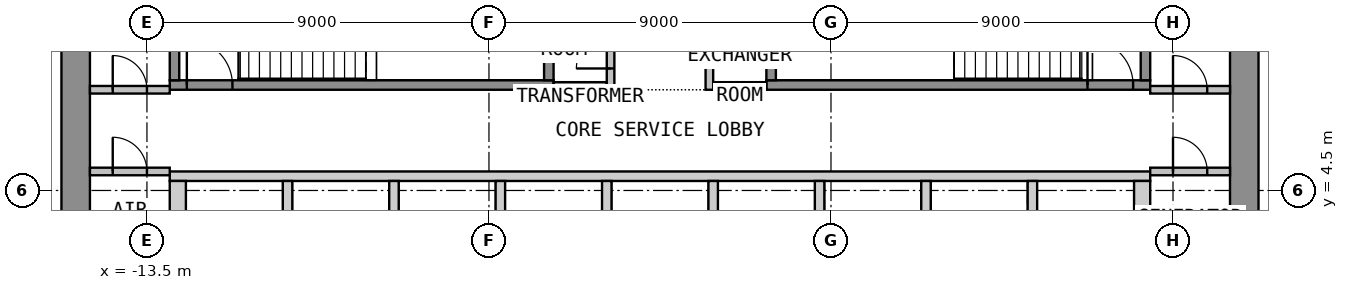
"""IFC4 building model, lengths in metres.
Left out: names, types, materials, properties, quantities, classifications, styles, units other than length and angle.
Written with IfcOpenShell. Run it as: python <this file> out.ifc"""

import sys

from ifc_helpers import new_model, si_unit, direction, frame, frame_2d, origin, place, context, subcontext, project, spatial, polyline, rectangle, outline, extrude, element, fill, save


model = new_model("IFC4")
c1 = context("Model", 3, precision=1e-05, world=origin(), true_north=direction((0.0, 1.0)))
c2 = subcontext(c1, "Body", "Model", "MODEL_VIEW")
j1 = project(units=[si_unit("LENGTHUNIT", "METRE"), si_unit("PLANEANGLEUNIT", "RADIAN")], contexts=[c1])
p1 = place(None, origin())
s1 = spatial("IfcSite", under=j1, at=p1, CompositionType="ELEMENT")
p2 = place(p1, origin())
s2 = spatial("IfcBuilding", under=s1, at=p2, CompositionType="ELEMENT")
p3 = place(p2, frame((0.0, 0.0, 128.1)))
s3 = spatial("IfcBuildingStorey", under=s2, at=p3, CompositionType="ELEMENT", Elevation=128.1)
p4 = place(p3, frame((-15.375, -12.75, 0.0), z_axis=(0.0, 0.0, 1.0), x_axis=(0.0, 1.0, 0.0)))
e1 = element("IfcWall", 1, at=p4, inside=s3, PredefinedType="SHEAR", context=c2, shape_type="SweptSolid", body=[
    extrude(rectangle(XDim=25.5, YDim=0.75, at=frame_2d((12.75, 0.0))), origin(), (0.0, 0.0, 1.0), 4.175),
])
p5 = place(p4, frame((11.55, 0.0, 0.0)))
e2 = element("IfcOpeningElement", 2, at=p5, cuts=e1, PredefinedType="OPENING", context=c2, shape_type="SweptSolid", body=[
    extrude(rectangle(XDim=2.4, YDim=2.1, at=frame_2d((1.2, 1.05))), frame((0.0, 0.385, 0.0), z_axis=(0.0, -1.0, 0.0), x_axis=(1.0, 0.0, 0.0)), (0.0, 0.0, 1.0), 0.77),
])
p6 = place(p3, frame((15.375, -12.75, 0.0), z_axis=(0.0, 0.0, 1.0), x_axis=(0.0, 1.0, 0.0)))
e3 = element("IfcWall", 3, at=p6, inside=s3, PredefinedType="SHEAR", context=c2, shape_type="SweptSolid", body=[
    extrude(rectangle(XDim=25.5, YDim=0.75, at=frame_2d((12.75, 0.0))), origin(), (0.0, 0.0, 1.0), 4.175),
])
p7 = place(p6, frame((11.55, 0.0, 0.0)))
e4 = element("IfcOpeningElement", 4, at=p7, cuts=e3, PredefinedType="OPENING", context=c2, shape_type="SweptSolid", body=[
    extrude(rectangle(XDim=2.4, YDim=2.1, at=frame_2d((1.2, 1.05))), frame((0.0, 0.385, 0.0), z_axis=(0.0, -1.0, 0.0), x_axis=(1.0, 0.0, 0.0)), (0.0, 0.0, 1.0), 0.77),
])
p8 = place(p3, origin())
e5 = element("IfcWall", 5, at=p8, inside=s3, PredefinedType="SHEAR", context=c2, shape_type="SweptSolid", body=[
    extrude(outline(polyline([(-12.9, 4.75), (12.9, 4.75), (12.9, 5.0), (-12.9, 5.0), (-12.9, 4.75)])), origin(), (0.0, 0.0, 1.0), 4.175),
])
p9 = place(p3, origin())
e6 = element("IfcWall", 6, at=p9, inside=s3, PredefinedType="SHEAR", context=c2, shape_type="SweptSolid", body=[
    extrude(outline(polyline([(-12.9, 2.05), (-12.475, 2.05), (-12.475, 4.75), (-12.9, 4.75), (-12.9, 2.05)])), origin(), (0.0, 0.0, 1.0), 4.175),
])
p10 = place(p3, origin())
e7 = element("IfcWall", 7, at=p10, inside=s3, PredefinedType="SHEAR", context=c2, shape_type="SweptSolid", body=[
    extrude(outline(polyline([(-9.925, 2.05), (-9.675, 2.05), (-9.675, 4.75), (-9.925, 4.75), (-9.925, 2.05)])), origin(), (0.0, 0.0, 1.0), 4.175),
])
p11 = place(p3, origin())
e8 = element("IfcWall", 8, at=p11, inside=s3, PredefinedType="SHEAR", context=c2, shape_type="SweptSolid", body=[
    extrude(outline(polyline([(-7.125, 2.05), (-6.875, 2.05), (-6.875, 4.75), (-7.125, 4.75), (-7.125, 2.05)])), origin(), (0.0, 0.0, 1.0), 4.175),
])
p12 = place(p3, origin())
e9 = element("IfcWall", 9, at=p12, inside=s3, PredefinedType="SHEAR", context=c2, shape_type="SweptSolid", body=[
    extrude(outline(polyline([(-4.325, 2.05), (-4.075, 2.05), (-4.075, 4.75), (-4.325, 4.75), (-4.325, 2.05)])), origin(), (0.0, 0.0, 1.0), 4.175),
])
p13 = place(p3, origin())
e10 = element("IfcWall", 10, at=p13, inside=s3, PredefinedType="SHEAR", context=c2, shape_type="SweptSolid", body=[
    extrude(outline(polyline([(-1.525, 2.05), (-1.275, 2.05), (-1.275, 4.75), (-1.525, 4.75), (-1.525, 2.05)])), origin(), (0.0, 0.0, 1.0), 4.175),
])
p14 = place(p3, origin())
e11 = element("IfcWall", 11, at=p14, inside=s3, PredefinedType="SHEAR", context=c2, shape_type="SweptSolid", body=[
    extrude(outline(polyline([(1.275, 2.05), (1.525, 2.05), (1.525, 4.75), (1.275, 4.75), (1.275, 2.05)])), origin(), (0.0, 0.0, 1.0), 4.175),
])
p15 = place(p3, origin())
e12 = element("IfcWall", 12, at=p15, inside=s3, PredefinedType="SHEAR", context=c2, shape_type="SweptSolid", body=[
    extrude(outline(polyline([(4.075, 2.05), (4.325, 2.05), (4.325, 4.75), (4.075, 4.75), (4.075, 2.05)])), origin(), (0.0, 0.0, 1.0), 4.175),
])
p16 = place(p3, origin())
e13 = element("IfcWall", 13, at=p16, inside=s3, PredefinedType="SHEAR", context=c2, shape_type="SweptSolid", body=[
    extrude(outline(polyline([(6.875, 2.05), (7.125, 2.05), (7.125, 4.75), (6.875, 4.75), (6.875, 2.05)])), origin(), (0.0, 0.0, 1.0), 4.175),
])
p17 = place(p3, origin())
e14 = element("IfcWall", 14, at=p17, inside=s3, PredefinedType="SHEAR", context=c2, shape_type="SweptSolid", body=[
    extrude(outline(polyline([(9.675, 2.05), (9.925, 2.05), (9.925, 4.75), (9.675, 4.75), (9.675, 2.05)])), origin(), (0.0, 0.0, 1.0), 4.175),
])
p18 = place(p3, origin())
e15 = element("IfcWall", 15, at=p18, inside=s3, PredefinedType="SHEAR", context=c2, shape_type="SweptSolid", body=[
    extrude(outline(polyline([(12.475, 2.05), (12.9, 2.05), (12.9, 4.75), (12.475, 4.75), (12.475, 2.05)])), origin(), (0.0, 0.0, 1.0), 4.175),
])
p19 = place(p3, frame((-12.9, 7.275, 0.0), z_axis=(0.0, 0.0, 1.0), x_axis=(1.0, 0.0, 0.0)))
e16 = element("IfcWall", 16, at=p19, inside=s3, PredefinedType="SHEAR", context=c2, shape_type="SweptSolid", body=[
    extrude(rectangle(XDim=10.1, YDim=0.25, at=frame_2d((5.05, 0.0))), origin(), (0.0, 0.0, 1.0), 4.175),
])
p20 = place(p19, frame((0.45, 0.0, 0.0)))
e17 = element("IfcOpeningElement", 17, at=p20, cuts=e16, PredefinedType="OPENING", context=c2, shape_type="SweptSolid", body=[
    extrude(rectangle(XDim=1.2, YDim=2.1, at=frame_2d((0.6, 1.05))), frame((0.0, 0.135, 0.0), z_axis=(0.0, -1.0, 0.0), x_axis=(1.0, 0.0, 0.0)), (0.0, 0.0, 1.0), 0.27),
])
for number, where, z_axis, x_axis in (
    (18, (-12.775, 7.4, 0.0), (0.0, 0.0, 1.0), (0.0, 1.0, 0.0)),
    (19, (-2.925, 7.4, 0.0), (0.0, 0.0, 1.0), (0.0, 1.0, 0.0)),
):
    element("IfcWall", number, at=place(p3, frame(where, z_axis=z_axis, x_axis=x_axis)), inside=s3, PredefinedType="SHEAR", context=c2, shape_type="SweptSolid", body=[
        extrude(rectangle(XDim=3.25, YDim=0.25, at=frame_2d((1.625, 0.0))), origin(), (0.0, 0.0, 1.0), 4.175),
    ])
p21 = place(p3, frame((2.8, 7.275, 0.0), z_axis=(0.0, 0.0, 1.0), x_axis=(1.0, 0.0, 0.0)))
e20 = element("IfcWall", 20, at=p21, inside=s3, PredefinedType="SHEAR", context=c2, shape_type="SweptSolid", body=[
    extrude(rectangle(XDim=10.1, YDim=0.25, at=frame_2d((5.05, 0.0))), origin(), (0.0, 0.0, 1.0), 4.175),
])
p22 = place(p21, frame((8.45, 0.0, 0.0)))
e21 = element("IfcOpeningElement", 21, at=p22, cuts=e20, PredefinedType="OPENING", context=c2, shape_type="SweptSolid", body=[
    extrude(rectangle(XDim=1.2, YDim=2.1, at=frame_2d((0.6, 1.05))), frame((0.0, 0.135, 0.0), z_axis=(0.0, -1.0, 0.0), x_axis=(1.0, 0.0, 0.0)), (0.0, 0.0, 1.0), 0.27),
])
for number, where, z_axis, x_axis in (
    (22, (2.925, 7.4, 0.0), (0.0, 0.0, 1.0), (0.0, 1.0, 0.0)),
    (23, (12.775, 7.4, 0.0), (0.0, 0.0, 1.0), (0.0, 1.0, 0.0)),
):
    element("IfcWall", number, at=place(p3, frame(where, z_axis=z_axis, x_axis=x_axis)), inside=s3, PredefinedType="SHEAR", context=c2, shape_type="SweptSolid", body=[
        extrude(rectangle(XDim=3.25, YDim=0.25, at=frame_2d((1.625, 0.0))), origin(), (0.0, 0.0, 1.0), 4.175),
    ])
for number, where, z_axis, x_axis in (
    (24, (-2.8, 7.25, 0.0), (0.0, 0.0, 1.0), (1.0, 0.0, 0.0)),
    (25, (1.4, 7.25, 0.0), (0.0, 0.0, 1.0), (1.0, 0.0, 0.0)),
):
    element("IfcWall", number, at=place(p3, frame(where, z_axis=z_axis, x_axis=x_axis)), inside=s3, PredefinedType="PARTITIONING", context=c2, shape_type="SweptSolid", body=[
        extrude(rectangle(XDim=1.4, YDim=0.2, at=frame_2d((0.7, 0.0))), origin(), (0.0, 0.0, 1.0), 4.175),
    ])
p23 = place(p3, frame((-1.3, 7.15, 0.0), z_axis=(0.0, 0.0, 1.0), x_axis=(0.0, 1.0, 0.0)))
e26 = element("IfcWall", 26, at=p23, inside=s3, PredefinedType="PARTITIONING", context=c2, shape_type="SweptSolid", body=[
    extrude(rectangle(XDim=5.6, YDim=0.2, at=frame_2d((2.8, 0.0))), origin(), (0.0, 0.0, 1.0), 4.175),
])
p24 = place(p23, frame((0.56, 0.0, 0.0)))
e27 = element("IfcOpeningElement", 27, at=p24, cuts=e26, PredefinedType="OPENING", context=c2, shape_type="SweptSolid", body=[
    extrude(rectangle(XDim=0.9, YDim=2.1, at=frame_2d((0.45, 1.05))), frame((0.0, 0.11, 0.0), z_axis=(0.0, -1.0, 0.0), x_axis=(1.0, 0.0, 0.0)), (0.0, 0.0, 1.0), 0.22),
])
p25 = place(p23, frame((3.26, 0.0, 0.0)))
e28 = element("IfcOpeningElement", 28, at=p25, cuts=e26, PredefinedType="OPENING", context=c2, shape_type="SweptSolid", body=[
    extrude(rectangle(XDim=0.9, YDim=2.1, at=frame_2d((0.45, 1.05))), frame((0.0, 0.11, 0.0), z_axis=(0.0, -1.0, 0.0), x_axis=(1.0, 0.0, 0.0)), (0.0, 0.0, 1.0), 0.22),
])
p26 = place(p3, frame((1.3, 7.15, 0.0), z_axis=(0.0, 0.0, 1.0), x_axis=(0.0, 1.0, 0.0)))
e29 = element("IfcWall", 29, at=p26, inside=s3, PredefinedType="PARTITIONING", context=c2, shape_type="SweptSolid", body=[
    extrude(rectangle(XDim=5.6, YDim=0.2, at=frame_2d((2.8, 0.0))), origin(), (0.0, 0.0, 1.0), 4.175),
])
p27 = place(p26, frame((1.64, 0.0, 0.0)))
e30 = element("IfcOpeningElement", 30, at=p27, cuts=e29, PredefinedType="OPENING", context=c2, shape_type="SweptSolid", body=[
    extrude(rectangle(XDim=0.9, YDim=2.1, at=frame_2d((0.45, 1.05))), frame((0.0, 0.11, 0.0), z_axis=(0.0, -1.0, 0.0), x_axis=(1.0, 0.0, 0.0)), (0.0, 0.0, 1.0), 0.22),
])
p28 = place(p26, frame((4.34, 0.0, 0.0)))
e31 = element("IfcOpeningElement", 31, at=p28, cuts=e29, PredefinedType="OPENING", context=c2, shape_type="SweptSolid", body=[
    extrude(rectangle(XDim=0.9, YDim=2.1, at=frame_2d((0.45, 1.05))), frame((0.0, 0.11, 0.0), z_axis=(0.0, -1.0, 0.0), x_axis=(1.0, 0.0, 0.0)), (0.0, 0.0, 1.0), 0.22),
])
p29 = place(p3, frame((-15.0, 7.15, 0.0), z_axis=(0.0, 0.0, 1.0), x_axis=(1.0, 0.0, 0.0)))
e32 = element("IfcWall", 32, at=p29, inside=s3, PredefinedType="PARTITIONING", context=c2, shape_type="SweptSolid", body=[
    extrude(rectangle(XDim=2.1, YDim=0.2, at=frame_2d((1.05, 0.0))), origin(), (0.0, 0.0, 1.0), 4.175),
])
p30 = place(p29, frame((0.6, 0.0, 0.0)))
e33 = element("IfcOpeningElement", 33, at=p30, cuts=e32, PredefinedType="OPENING", context=c2, shape_type="SweptSolid", body=[
    extrude(rectangle(XDim=0.9, YDim=2.1, at=frame_2d((0.45, 1.05))), frame((0.0, 0.11, 0.0), z_axis=(0.0, -1.0, 0.0), x_axis=(1.0, 0.0, 0.0)), (0.0, 0.0, 1.0), 0.22),
])
p31 = place(p3, frame((-15.0, 5.0, 0.0), z_axis=(0.0, 0.0, 1.0), x_axis=(1.0, 0.0, 0.0)))
e34 = element("IfcWall", 34, at=p31, inside=s3, PredefinedType="PARTITIONING", context=c2, shape_type="SweptSolid", body=[
    extrude(rectangle(XDim=2.1, YDim=0.2, at=frame_2d((1.05, 0.0))), origin(), (0.0, 0.0, 1.0), 4.175),
])
p32 = place(p31, frame((0.6, 0.0, 0.0)))
e35 = element("IfcOpeningElement", 35, at=p32, cuts=e34, PredefinedType="OPENING", context=c2, shape_type="SweptSolid", body=[
    extrude(rectangle(XDim=0.9, YDim=2.1, at=frame_2d((0.45, 1.05))), frame((0.0, 0.11, 0.0), z_axis=(0.0, -1.0, 0.0), x_axis=(1.0, 0.0, 0.0)), (0.0, 0.0, 1.0), 0.22),
])
p33 = place(p3, frame((12.9, 7.15, 0.0), z_axis=(0.0, 0.0, 1.0), x_axis=(1.0, 0.0, 0.0)))
e36 = element("IfcWall", 36, at=p33, inside=s3, PredefinedType="PARTITIONING", context=c2, shape_type="SweptSolid", body=[
    extrude(rectangle(XDim=2.1, YDim=0.2, at=frame_2d((1.05, 0.0))), origin(), (0.0, 0.0, 1.0), 4.175),
])
p34 = place(p33, frame((0.6, 0.0, 0.0)))
e37 = element("IfcOpeningElement", 37, at=p34, cuts=e36, PredefinedType="OPENING", context=c2, shape_type="SweptSolid", body=[
    extrude(rectangle(XDim=0.9, YDim=2.1, at=frame_2d((0.45, 1.05))), frame((0.0, 0.11, 0.0), z_axis=(0.0, -1.0, 0.0), x_axis=(1.0, 0.0, 0.0)), (0.0, 0.0, 1.0), 0.22),
])
p35 = place(p3, frame((12.9, 5.0, 0.0), z_axis=(0.0, 0.0, 1.0), x_axis=(1.0, 0.0, 0.0)))
e38 = element("IfcWall", 38, at=p35, inside=s3, PredefinedType="PARTITIONING", context=c2, shape_type="SweptSolid", body=[
    extrude(rectangle(XDim=2.1, YDim=0.2, at=frame_2d((1.05, 0.0))), origin(), (0.0, 0.0, 1.0), 4.175),
])
p36 = place(p35, frame((0.6, 0.0, 0.0)))
e39 = element("IfcOpeningElement", 39, at=p36, cuts=e38, PredefinedType="OPENING", context=c2, shape_type="SweptSolid", body=[
    extrude(rectangle(XDim=0.9, YDim=2.1, at=frame_2d((0.45, 1.05))), frame((0.0, 0.11, 0.0), z_axis=(0.0, -1.0, 0.0), x_axis=(1.0, 0.0, 0.0)), (0.0, 0.0, 1.0), 0.22),
])
p37 = place(p20, origin())
e40 = element("IfcDoor", 40, at=p37, inside=s3, OperationType="SINGLE_SWING_LEFT", PredefinedType="DOOR", context=c2, shape_type="SweptSolid", body=[
    extrude(rectangle(XDim=1.2, YDim=2.1, at=frame_2d((0.6, 1.05))), frame((0.0, 0.025, 0.0), z_axis=(0.0, -1.0, 0.0), x_axis=(1.0, 0.0, 0.0)), (0.0, 0.0, 1.0), 0.05),
])
fill(e17, e40)
p38 = place(p22, origin())
e41 = element("IfcDoor", 41, at=p38, inside=s3, OperationType="SINGLE_SWING_LEFT", PredefinedType="DOOR", context=c2, shape_type="SweptSolid", body=[
    extrude(rectangle(XDim=1.2, YDim=2.1, at=frame_2d((0.6, 1.05))), frame((0.0, 0.025, 0.0), z_axis=(0.0, -1.0, 0.0), x_axis=(1.0, 0.0, 0.0)), (0.0, 0.0, 1.0), 0.05),
])
fill(e21, e41)
p39 = place(p24, origin())
e42 = element("IfcDoor", 42, at=p39, inside=s3, OperationType="SINGLE_SWING_LEFT", PredefinedType="DOOR", context=c2, shape_type="SweptSolid", body=[
    extrude(rectangle(XDim=0.9, YDim=2.1, at=frame_2d((0.45, 1.05))), frame((0.0, 0.025, 0.0), z_axis=(0.0, -1.0, 0.0), x_axis=(1.0, 0.0, 0.0)), (0.0, 0.0, 1.0), 0.05),
])
fill(e27, e42)
p40 = place(p30, origin())
e43 = element("IfcDoor", 43, at=p40, inside=s3, OperationType="SINGLE_SWING_LEFT", PredefinedType="DOOR", context=c2, shape_type="SweptSolid", body=[
    extrude(rectangle(XDim=0.9, YDim=2.1, at=frame_2d((0.45, 1.05))), frame((0.0, 0.025, 0.0), z_axis=(0.0, -1.0, 0.0), x_axis=(1.0, 0.0, 0.0)), (0.0, 0.0, 1.0), 0.05),
])
fill(e33, e43)
p41 = place(p32, origin())
e44 = element("IfcDoor", 44, at=p41, inside=s3, OperationType="SINGLE_SWING_LEFT", PredefinedType="DOOR", context=c2, shape_type="SweptSolid", body=[
    extrude(rectangle(XDim=0.9, YDim=2.1, at=frame_2d((0.45, 1.05))), frame((0.0, 0.025, 0.0), z_axis=(0.0, -1.0, 0.0), x_axis=(1.0, 0.0, 0.0)), (0.0, 0.0, 1.0), 0.05),
])
fill(e35, e44)
p42 = place(p34, origin())
e45 = element("IfcDoor", 45, at=p42, inside=s3, OperationType="SINGLE_SWING_LEFT", PredefinedType="DOOR", context=c2, shape_type="SweptSolid", body=[
    extrude(rectangle(XDim=0.9, YDim=2.1, at=frame_2d((0.45, 1.05))), frame((0.0, 0.025, 0.0), z_axis=(0.0, -1.0, 0.0), x_axis=(1.0, 0.0, 0.0)), (0.0, 0.0, 1.0), 0.05),
])
fill(e37, e45)
p43 = place(p36, origin())
e46 = element("IfcDoor", 46, at=p43, inside=s3, OperationType="SINGLE_SWING_LEFT", PredefinedType="DOOR", context=c2, shape_type="SweptSolid", body=[
    extrude(rectangle(XDim=0.9, YDim=2.1, at=frame_2d((0.45, 1.05))), frame((0.0, 0.025, 0.0), z_axis=(0.0, -1.0, 0.0), x_axis=(1.0, 0.0, 0.0)), (0.0, 0.0, 1.0), 0.05),
])
fill(e39, e46)
save(model, sys.argv[1])
